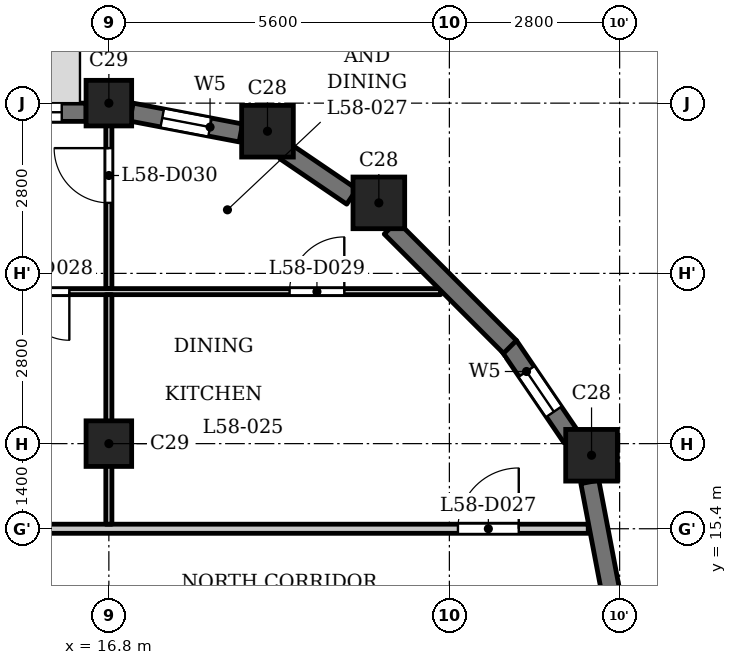
"""IFC4 building model, lengths in metres.
Left out: names, types, materials, properties, quantities, classifications, styles, units other than length and angle.
Written with IfcOpenShell. Run it as: python <this file> out.ifc"""

import sys

from ifc_helpers import new_model, si_unit, direction, frame, frame_2d, origin, origin_2d, place, context, subcontext, project, spatial, rectangle, extrude, element, fill, save


model = new_model("IFC4")
c1 = context("Model", 3, precision=1e-05, world=origin(), true_north=direction((0.0, 1.0)))
c2 = subcontext(c1, "Body", "Model", "MODEL_VIEW")
j1 = project(units=[si_unit("LENGTHUNIT", "METRE"), si_unit("PLANEANGLEUNIT", "RADIAN")], contexts=[c1])
p1 = place(None, origin())
s1 = spatial("IfcSite", under=j1, at=p1, CompositionType="ELEMENT")
p2 = place(p1, origin())
s2 = spatial("IfcBuilding", under=s1, at=p2, CompositionType="ELEMENT")
p3 = place(p2, frame((0.0, 0.0, 223.9)))
s3 = spatial("IfcBuildingStorey", under=s2, at=p3, CompositionType="ELEMENT", Elevation=223.9)
for number, where, z_axis, x_axis in (
    (1, (24.738, 16.609, 0.0), (0.0, 0.0, 1.0), (1.0, 0.0, 0.0)),
    (2, (21.24, 20.76, 0.0), (0.0, 0.0, 1.0), (1.0, 0.0, 0.0)),
    (3, (19.409, 21.938, 0.0), (0.0, 0.0, 1.0), (1.0, 0.0, 0.0)),
):
    element("IfcColumn", number, at=place(p3, frame(where, z_axis=z_axis, x_axis=x_axis)), inside=s3, PredefinedType="COLUMN", context=c2, shape_type="SweptSolid", body=[
        extrude(rectangle(XDim=0.85, YDim=0.85, at=origin_2d()), origin(), (0.0, 0.0, 1.0), 3.5),
    ])
for number, where, z_axis, x_axis in (
    (4, (16.8, 16.8, 0.0), (0.0, 0.0, 1.0), (1.0, 0.0, 0.0)),
    (5, (16.8, 22.4, 0.0), (0.0, 0.0, 1.0), (1.0, 0.0, 0.0)),
):
    element("IfcColumn", number, at=place(p3, frame(where, z_axis=z_axis, x_axis=x_axis)), inside=s3, PredefinedType="COLUMN", context=c2, shape_type="SweptSolid", body=[
        extrude(rectangle(XDim=0.75, YDim=0.75, at=origin_2d()), origin(), (0.0, 0.0, 1.0), 3.5),
    ])
p4 = place(p3, frame((25.053, 14.372, 0.0), z_axis=(0.0, 0.0, 1.0), x_axis=(-0.187442908742, 0.982275499014, 0.0)))
e6 = element("IfcWall", 6, at=p4, inside=s3, PredefinedType="SOLIDWALL", context=c2, shape_type="SweptSolid", body=[
    extrude(rectangle(XDim=1.831, YDim=0.3, at=frame_2d((0.916, 0.0))), origin(), (0.0, 0.0, 1.0), 2.5),
])
p5 = place(p3, frame((24.408, 16.898, 0.0), z_axis=(0.0, 0.0, 1.0), x_axis=(-0.562062033417, 0.827095079535, 0.0)))
e7 = element("IfcWall", 7, at=p5, inside=s3, PredefinedType="SOLIDWALL", context=c2, shape_type="SweptSolid", body=[
    extrude(rectangle(XDim=1.831, YDim=0.3, at=frame_2d((0.916, 0.0))), origin(), (0.0, 0.0, 1.0), 2.5),
])
p6 = place(p5, frame((0.516, 0.0, 0.6)))
e8 = element("IfcOpeningElement", 8, at=p6, cuts=e7, PredefinedType="OPENING", context=c2, shape_type="SweptSolid", body=[
    extrude(rectangle(XDim=0.8, YDim=1.55, at=frame_2d((0.4, 0.775))), frame((0.0, 0.16, 0.0), z_axis=(0.0, -1.0, 0.0), x_axis=(1.0, 0.0, 0.0)), (0.0, 0.0, 1.0), 0.32),
])
p7 = place(p3, frame((23.397, 18.391, 0.0), z_axis=(0.0, 0.0, 1.0), x_axis=(-0.707106781187, 0.707106781187, 0.0)))
e9 = element("IfcWall", 9, at=p7, inside=s3, PredefinedType="SOLIDWALL", context=c2, shape_type="SweptSolid", body=[
    extrude(rectangle(XDim=2.775, YDim=0.3, at=frame_2d((1.388, 0.0))), origin(), (0.0, 0.0, 1.0), 2.5),
])
p8 = place(p3, frame((20.796, 20.862, 0.0), z_axis=(0.0, 0.0, 1.0), x_axis=(-0.827035970432, 0.562149004813, 0.0)))
e10 = element("IfcWall", 10, at=p8, inside=s3, PredefinedType="SOLIDWALL", context=c2, shape_type="SweptSolid", body=[
    extrude(rectangle(XDim=1.327, YDim=0.3, at=frame_2d((0.664, 0.0))), origin(), (0.0, 0.0, 1.0), 2.5),
])
p9 = place(p3, frame((18.971, 21.91, 0.0), z_axis=(0.0, 0.0, 1.0), x_axis=(-0.982300037503, 0.187314271538, 0.0)))
e11 = element("IfcWall", 11, at=p9, inside=s3, PredefinedType="SOLIDWALL", context=c2, shape_type="SweptSolid", body=[
    extrude(rectangle(XDim=1.831, YDim=0.3, at=frame_2d((0.916, 0.0))), origin(), (0.0, 0.0, 1.0), 2.5),
])
p10 = place(p9, frame((0.516, 0.0, 0.6)))
e12 = element("IfcOpeningElement", 12, at=p10, cuts=e11, PredefinedType="OPENING", context=c2, shape_type="SweptSolid", body=[
    extrude(rectangle(XDim=0.8, YDim=1.55, at=frame_2d((0.4, 0.775))), frame((0.0, 0.16, 0.0), z_axis=(0.0, -1.0, 0.0), x_axis=(1.0, 0.0, 0.0)), (0.0, 0.0, 1.0), 0.32),
])
p11 = place(p3, frame((16.425, 22.25, 0.0), z_axis=(0.0, 0.0, 1.0), x_axis=(-1.0, 0.0, 0.0)))
e13 = element("IfcWall", 13, at=p11, inside=s3, PredefinedType="SOLIDWALL", context=c2, shape_type="SweptSolid", body=[
    extrude(rectangle(XDim=2.0, YDim=0.3, at=frame_2d((1.0, 0.0))), origin(), (0.0, 0.0, 1.0), 2.5),
])
p12 = place(p11, frame((0.4, 0.0, 0.6)))
e14 = element("IfcOpeningElement", 14, at=p12, cuts=e13, PredefinedType="OPENING", context=c2, shape_type="SweptSolid", body=[
    extrude(rectangle(XDim=1.2, YDim=1.55, at=frame_2d((0.6, 0.775))), frame((0.0, 0.16, 0.0), z_axis=(0.0, -1.0, 0.0), x_axis=(1.0, 0.0, 0.0)), (0.0, 0.0, 1.0), 0.32),
])
p13 = place(p3, frame((-24.684, 15.4, 0.0), z_axis=(0.0, 0.0, 1.0), x_axis=(1.0, 0.0, 0.0)))
e15 = element("IfcWall", 15, at=p13, inside=s3, PredefinedType="PARTITIONING", context=c2, shape_type="SweptSolid", body=[
    extrude(rectangle(XDim=49.368, YDim=0.15, at=frame_2d((24.684, 0.0))), origin(), (0.0, 0.0, 1.0), 3.2),
])
p14 = place(p13, frame((6.234, 0.0, 0.0)))
e16 = element("IfcOpeningElement", 16, at=p14, cuts=e15, PredefinedType="OPENING", context=c2, shape_type="SweptSolid", body=[
    extrude(rectangle(XDim=1.0, YDim=2.1, at=frame_2d((0.5, 1.05))), frame((0.0, 0.085, 0.0), z_axis=(0.0, -1.0, 0.0), x_axis=(1.0, 0.0, 0.0)), (0.0, 0.0, 1.0), 0.17),
])
p15 = place(p13, frame((17.434, 0.0, 0.0)))
e17 = element("IfcOpeningElement", 17, at=p15, cuts=e15, PredefinedType="OPENING", context=c2, shape_type="SweptSolid", body=[
    extrude(rectangle(XDim=1.0, YDim=2.1, at=frame_2d((0.5, 1.05))), frame((0.0, 0.085, 0.0), z_axis=(0.0, -1.0, 0.0), x_axis=(1.0, 0.0, 0.0)), (0.0, 0.0, 1.0), 0.17),
])
p16 = place(p13, frame((25.384, 0.0, 0.0)))
e18 = element("IfcOpeningElement", 18, at=p16, cuts=e15, PredefinedType="OPENING", context=c2, shape_type="SweptSolid", body=[
    extrude(rectangle(XDim=1.0, YDim=2.1, at=frame_2d((0.5, 1.05))), frame((0.0, 0.085, 0.0), z_axis=(0.0, -1.0, 0.0), x_axis=(1.0, 0.0, 0.0)), (0.0, 0.0, 1.0), 0.17),
])
p17 = place(p13, frame((33.484, 0.0, 0.0)))
e19 = element("IfcOpeningElement", 19, at=p17, cuts=e15, PredefinedType="OPENING", context=c2, shape_type="SweptSolid", body=[
    extrude(rectangle(XDim=1.0, YDim=2.1, at=frame_2d((0.5, 1.05))), frame((0.0, 0.085, 0.0), z_axis=(0.0, -1.0, 0.0), x_axis=(1.0, 0.0, 0.0)), (0.0, 0.0, 1.0), 0.17),
])
p18 = place(p13, frame((47.225, 0.0, 0.0)))
e20 = element("IfcOpeningElement", 20, at=p18, cuts=e15, PredefinedType="OPENING", context=c2, shape_type="SweptSolid", body=[
    extrude(rectangle(XDim=1.0, YDim=2.1, at=frame_2d((0.5, 1.05))), frame((0.0, 0.085, 0.0), z_axis=(0.0, -1.0, 0.0), x_axis=(1.0, 0.0, 0.0)), (0.0, 0.0, 1.0), 0.17),
])
p19 = place(p3, frame((-22.256, 19.3, 0.0), z_axis=(0.0, 0.0, 1.0), x_axis=(1.0, 0.0, 0.0)))
e21 = element("IfcWall", 21, at=p19, inside=s3, PredefinedType="PARTITIONING", context=c2, shape_type="SweptSolid", body=[
    extrude(rectangle(XDim=44.511, YDim=0.1, at=frame_2d((22.256, 0.0))), origin(), (0.0, 0.0, 1.0), 3.2),
])
p20 = place(p19, frame((9.606, 0.0, 0.0)))
e22 = element("IfcOpeningElement", 22, at=p20, cuts=e21, PredefinedType="OPENING", context=c2, shape_type="SweptSolid", body=[
    extrude(rectangle(XDim=0.8, YDim=2.1, at=frame_2d((0.4, 1.05))), frame((0.0, 0.06, 0.0), z_axis=(0.0, -1.0, 0.0), x_axis=(1.0, 0.0, 0.0)), (0.0, 0.0, 1.0), 0.12),
])
p21 = place(p19, frame((3.906, 0.0, 0.0)))
e23 = element("IfcOpeningElement", 23, at=p21, cuts=e21, PredefinedType="OPENING", context=c2, shape_type="SweptSolid", body=[
    extrude(rectangle(XDim=0.9, YDim=2.1, at=frame_2d((0.45, 1.05))), frame((0.0, 0.06, 0.0), z_axis=(0.0, -1.0, 0.0), x_axis=(1.0, 0.0, 0.0)), (0.0, 0.0, 1.0), 0.12),
])
p22 = place(p19, frame((11.706, 0.0, 0.0)))
e24 = element("IfcOpeningElement", 24, at=p22, cuts=e21, PredefinedType="OPENING", context=c2, shape_type="SweptSolid", body=[
    extrude(rectangle(XDim=0.8, YDim=2.1, at=frame_2d((0.4, 1.05))), frame((0.0, 0.06, 0.0), z_axis=(0.0, -1.0, 0.0), x_axis=(1.0, 0.0, 0.0)), (0.0, 0.0, 1.0), 0.12),
])
p23 = place(p19, frame((15.106, 0.0, 0.0)))
e25 = element("IfcOpeningElement", 25, at=p23, cuts=e21, PredefinedType="OPENING", context=c2, shape_type="SweptSolid", body=[
    extrude(rectangle(XDim=0.9, YDim=2.1, at=frame_2d((0.45, 1.05))), frame((0.0, 0.06, 0.0), z_axis=(0.0, -1.0, 0.0), x_axis=(1.0, 0.0, 0.0)), (0.0, 0.0, 1.0), 0.12),
])
p24 = place(p19, frame((17.556, 0.0, 0.0)))
e26 = element("IfcOpeningElement", 26, at=p24, cuts=e21, PredefinedType="OPENING", context=c2, shape_type="SweptSolid", body=[
    extrude(rectangle(XDim=0.8, YDim=2.1, at=frame_2d((0.4, 1.05))), frame((0.0, 0.06, 0.0), z_axis=(0.0, -1.0, 0.0), x_axis=(1.0, 0.0, 0.0)), (0.0, 0.0, 1.0), 0.12),
])
p25 = place(p19, frame((19.956, 0.0, 0.0)))
e27 = element("IfcOpeningElement", 27, at=p25, cuts=e21, PredefinedType="OPENING", context=c2, shape_type="SweptSolid", body=[
    extrude(rectangle(XDim=0.9, YDim=2.1, at=frame_2d((0.45, 1.05))), frame((0.0, 0.06, 0.0), z_axis=(0.0, -1.0, 0.0), x_axis=(1.0, 0.0, 0.0)), (0.0, 0.0, 1.0), 0.12),
])
p26 = place(p19, frame((23.456, 0.0, 0.0)))
e28 = element("IfcOpeningElement", 28, at=p26, cuts=e21, PredefinedType="OPENING", context=c2, shape_type="SweptSolid", body=[
    extrude(rectangle(XDim=0.9, YDim=2.1, at=frame_2d((0.45, 1.05))), frame((0.0, 0.06, 0.0), z_axis=(0.0, -1.0, 0.0), x_axis=(1.0, 0.0, 0.0)), (0.0, 0.0, 1.0), 0.12),
])
p27 = place(p19, frame((26.056, 0.0, 0.0)))
e29 = element("IfcOpeningElement", 29, at=p27, cuts=e21, PredefinedType="OPENING", context=c2, shape_type="SweptSolid", body=[
    extrude(rectangle(XDim=0.9, YDim=2.1, at=frame_2d((0.45, 1.05))), frame((0.0, 0.06, 0.0), z_axis=(0.0, -1.0, 0.0), x_axis=(1.0, 0.0, 0.0)), (0.0, 0.0, 1.0), 0.12),
])
p28 = place(p19, frame((28.756, 0.0, 0.0)))
e30 = element("IfcOpeningElement", 30, at=p28, cuts=e21, PredefinedType="OPENING", context=c2, shape_type="SweptSolid", body=[
    extrude(rectangle(XDim=0.8, YDim=2.1, at=frame_2d((0.4, 1.05))), frame((0.0, 0.06, 0.0), z_axis=(0.0, -1.0, 0.0), x_axis=(1.0, 0.0, 0.0)), (0.0, 0.0, 1.0), 0.12),
])
p29 = place(p19, frame((31.156, 0.0, 0.0)))
e31 = element("IfcOpeningElement", 31, at=p29, cuts=e21, PredefinedType="OPENING", context=c2, shape_type="SweptSolid", body=[
    extrude(rectangle(XDim=0.9, YDim=2.1, at=frame_2d((0.45, 1.05))), frame((0.0, 0.06, 0.0), z_axis=(0.0, -1.0, 0.0), x_axis=(1.0, 0.0, 0.0)), (0.0, 0.0, 1.0), 0.12),
])
p30 = place(p19, frame((37.606, 0.0, 0.0)))
e32 = element("IfcOpeningElement", 32, at=p30, cuts=e21, PredefinedType="OPENING", context=c2, shape_type="SweptSolid", body=[
    extrude(rectangle(XDim=0.8, YDim=2.1, at=frame_2d((0.4, 1.05))), frame((0.0, 0.06, 0.0), z_axis=(0.0, -1.0, 0.0), x_axis=(1.0, 0.0, 0.0)), (0.0, 0.0, 1.0), 0.12),
])
p31 = place(p19, frame((42.028, 0.0, 0.0)))
e33 = element("IfcOpeningElement", 33, at=p31, cuts=e21, PredefinedType="OPENING", context=c2, shape_type="SweptSolid", body=[
    extrude(rectangle(XDim=0.9, YDim=2.1, at=frame_2d((0.45, 1.05))), frame((0.0, 0.06, 0.0), z_axis=(0.0, -1.0, 0.0), x_axis=(1.0, 0.0, 0.0)), (0.0, 0.0, 1.0), 0.12),
])
p32 = place(p3, frame((16.8, 15.475, 0.0), z_axis=(0.0, 0.0, 1.0), x_axis=(0.0, 1.0, 0.0)))
e34 = element("IfcWall", 34, at=p32, inside=s3, PredefinedType="PARTITIONING", context=c2, shape_type="SweptSolid", body=[
    extrude(rectangle(XDim=3.775, YDim=0.1, at=frame_2d((1.887, 0.0))), origin(), (0.0, 0.0, 1.0), 2.55),
])
p33 = place(p3, frame((16.8, 19.35, 0.0), z_axis=(0.0, 0.0, 1.0), x_axis=(0.0, 1.0, 0.0)))
e35 = element("IfcWall", 35, at=p33, inside=s3, PredefinedType="PARTITIONING", context=c2, shape_type="SweptSolid", body=[
    extrude(rectangle(XDim=2.96, YDim=0.1, at=frame_2d((1.48, 0.0))), origin(), (0.0, 0.0, 1.0), 2.55),
])
p34 = place(p33, frame((1.41, 0.0, 0.0)))
e36 = element("IfcOpeningElement", 36, at=p34, cuts=e35, PredefinedType="OPENING", context=c2, shape_type="SweptSolid", body=[
    extrude(rectangle(XDim=0.9, YDim=2.1, at=frame_2d((0.45, 1.05))), frame((0.0, 0.06, 0.0), z_axis=(0.0, -1.0, 0.0), x_axis=(1.0, 0.0, 0.0)), (0.0, 0.0, 1.0), 0.12),
])
p35 = place(p18, origin())
e37 = element("IfcDoor", 37, at=p35, inside=s3, OperationType="SINGLE_SWING_LEFT", PredefinedType="DOOR", context=c2, shape_type="SweptSolid", body=[
    extrude(rectangle(XDim=1.0, YDim=2.1, at=frame_2d((0.5, 1.05))), frame((0.0, 0.025, 0.0), z_axis=(0.0, -1.0, 0.0), x_axis=(1.0, 0.0, 0.0)), (0.0, 0.0, 1.0), 0.05),
])
fill(e20, e37)
p36 = place(p30, origin())
e38 = element("IfcDoor", 38, at=p36, inside=s3, OperationType="SINGLE_SWING_RIGHT", PredefinedType="DOOR", context=c2, shape_type="SweptSolid", body=[
    extrude(rectangle(XDim=0.8, YDim=2.1, at=frame_2d((0.4, 1.05))), frame((0.0, 0.025, 0.0), z_axis=(0.0, -1.0, 0.0), x_axis=(1.0, 0.0, 0.0)), (0.0, 0.0, 1.0), 0.05),
])
fill(e32, e38)
p37 = place(p31, origin())
e39 = element("IfcDoor", 39, at=p37, inside=s3, OperationType="SINGLE_SWING_LEFT", PredefinedType="DOOR", context=c2, shape_type="SweptSolid", body=[
    extrude(rectangle(XDim=0.9, YDim=2.1, at=frame_2d((0.45, 1.05))), frame((0.0, 0.025, 0.0), z_axis=(0.0, -1.0, 0.0), x_axis=(1.0, 0.0, 0.0)), (0.0, 0.0, 1.0), 0.05),
])
fill(e33, e39)
p38 = place(p34, origin())
e40 = element("IfcDoor", 40, at=p38, inside=s3, OperationType="SINGLE_SWING_LEFT", PredefinedType="DOOR", context=c2, shape_type="SweptSolid", body=[
    extrude(rectangle(XDim=0.9, YDim=2.1, at=frame_2d((0.45, 1.05))), frame((0.0, 0.025, 0.0), z_axis=(0.0, -1.0, 0.0), x_axis=(1.0, 0.0, 0.0)), (0.0, 0.0, 1.0), 0.05),
])
fill(e36, e40)
p39 = place(p6, origin())
e41 = element("IfcWindow", 41, at=p39, inside=s3, PartitioningType="SINGLE_PANEL", PredefinedType="WINDOW", context=c2, shape_type="SweptSolid", body=[
    extrude(rectangle(XDim=0.8, YDim=1.55, at=frame_2d((0.4, 0.775))), frame((0.0, 0.03, 0.0), z_axis=(0.0, -1.0, 0.0), x_axis=(1.0, 0.0, 0.0)), (0.0, 0.0, 1.0), 0.06),
])
fill(e8, e41)
p40 = place(p10, origin())
e42 = element("IfcWindow", 42, at=p40, inside=s3, PartitioningType="SINGLE_PANEL", PredefinedType="WINDOW", context=c2, shape_type="SweptSolid", body=[
    extrude(rectangle(XDim=0.8, YDim=1.55, at=frame_2d((0.4, 0.775))), frame((0.0, 0.03, 0.0), z_axis=(0.0, -1.0, 0.0), x_axis=(1.0, 0.0, 0.0)), (0.0, 0.0, 1.0), 0.06),
])
fill(e12, e42)
p41 = place(p12, origin())
e43 = element("IfcWindow", 43, at=p41, inside=s3, PartitioningType="SINGLE_PANEL", PredefinedType="WINDOW", context=c2, shape_type="SweptSolid", body=[
    extrude(rectangle(XDim=1.2, YDim=1.55, at=frame_2d((0.6, 0.775))), frame((0.0, 0.03, 0.0), z_axis=(0.0, -1.0, 0.0), x_axis=(1.0, 0.0, 0.0)), (0.0, 0.0, 1.0), 0.06),
])
fill(e14, e43)
save(model, sys.argv[1])
